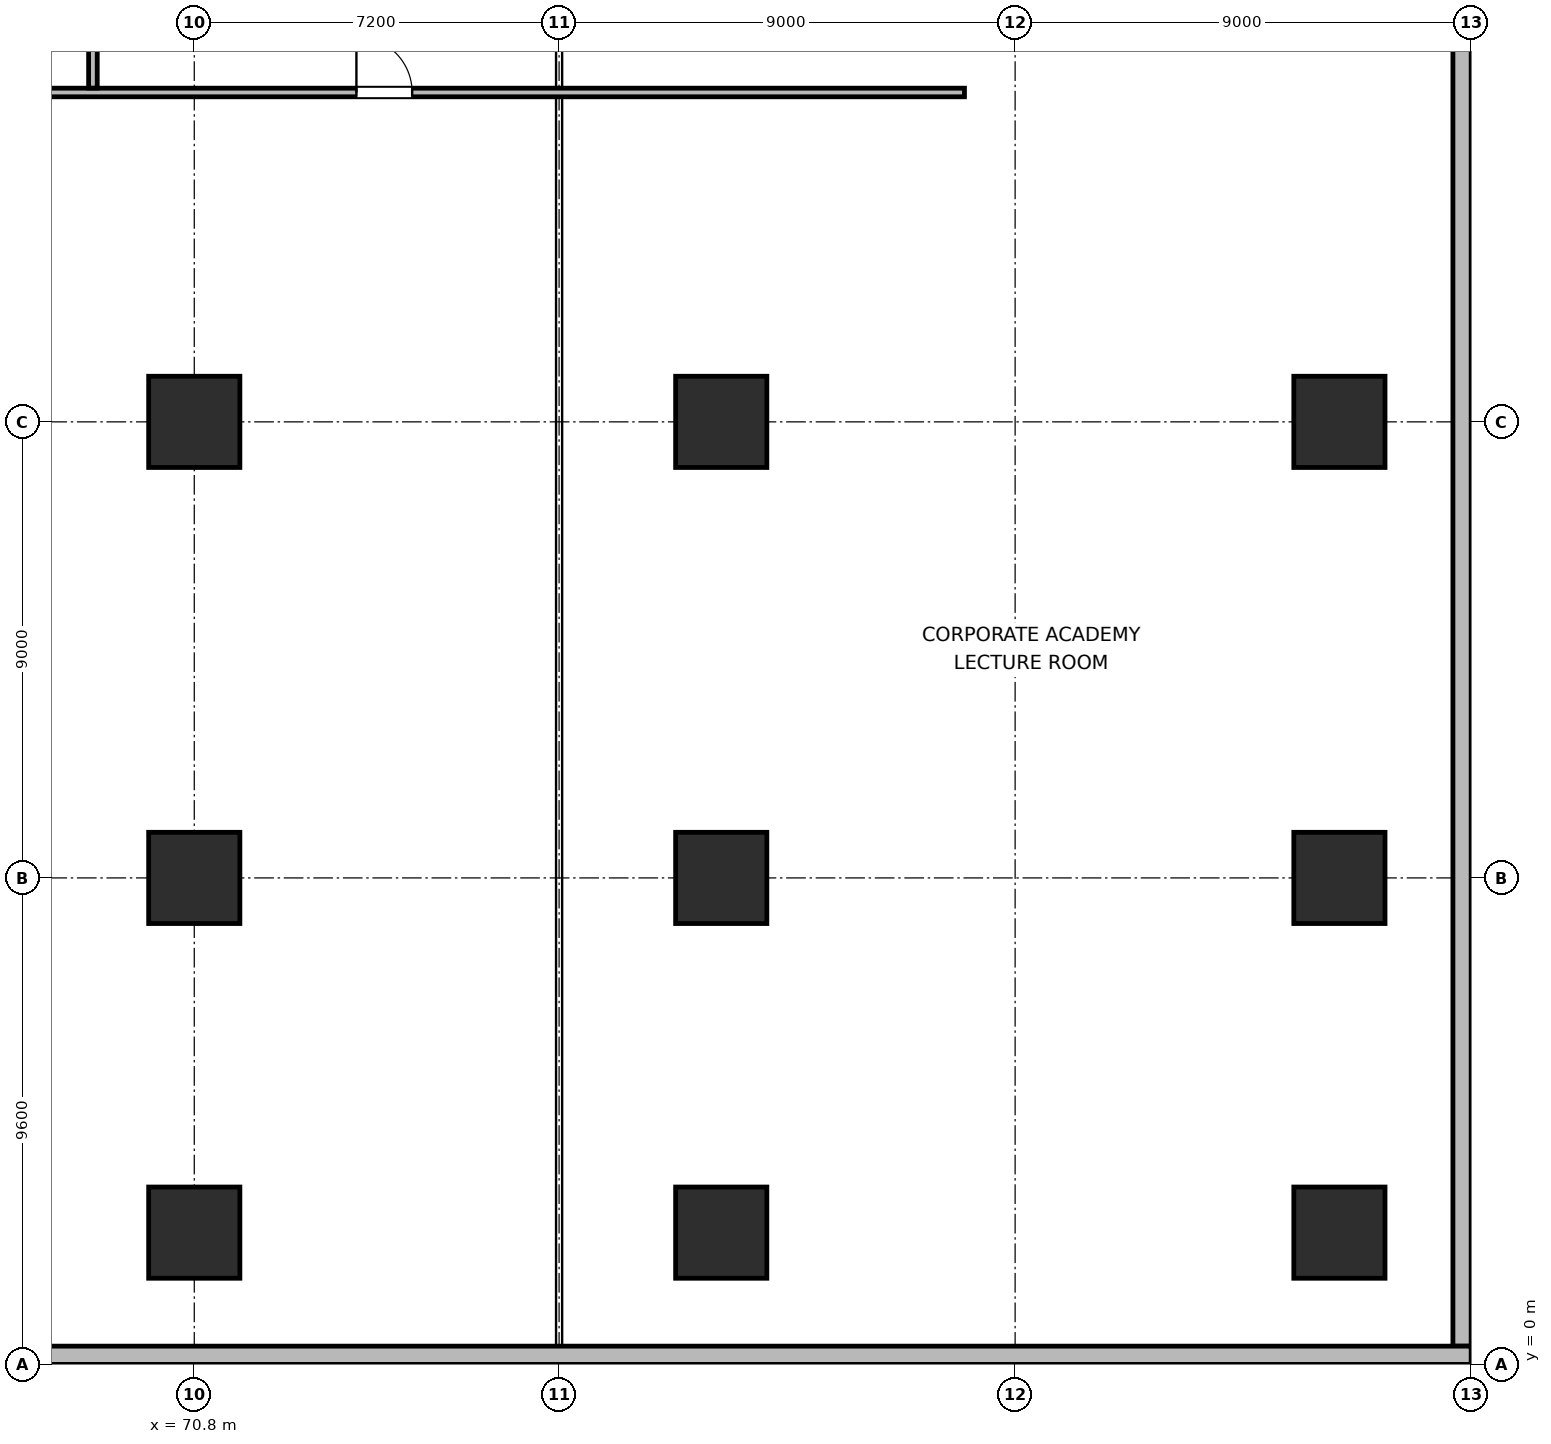
"""IFC4 building model, lengths in metres.
Left out: names, types, materials, properties, quantities, classifications, styles, units other than length and angle.
Written with IfcOpenShell. Run it as: python <this file> out.ifc"""

import sys

from ifc_helpers import new_model, si_unit, direction, frame, frame_2d, origin, origin_2d, place, context, subcontext, project, spatial, rectangle, extrude, element, fill, save


model = new_model("IFC4")
c1 = context("Model", 3, precision=1e-05, world=origin(), true_north=direction((0.0, 1.0)))
c2 = subcontext(c1, "Body", "Model", "MODEL_VIEW")
j1 = project(units=[si_unit("LENGTHUNIT", "METRE"), si_unit("PLANEANGLEUNIT", "RADIAN")], contexts=[c1])
p1 = place(None, origin())
s1 = spatial("IfcSite", under=j1, at=p1, CompositionType="ELEMENT")
p2 = place(p1, origin())
s2 = spatial("IfcBuilding", under=s1, at=p2, CompositionType="ELEMENT")
p3 = place(p2, frame((0.0, 0.0, 12.9)))
s3 = spatial("IfcBuildingStorey", under=s2, at=p3, CompositionType="ELEMENT", Elevation=12.9)
for number, where, z_axis, x_axis in (
    (1, (70.8, 2.6, 0.0), (0.0, 0.0, 1.0), (1.0, 0.0, 0.0)),
    (2, (70.8, 9.6, 0.0), (0.0, 0.0, 1.0), (1.0, 0.0, 0.0)),
    (3, (70.8, 18.6, 0.0), (0.0, 0.0, 1.0), (1.0, 0.0, 0.0)),
    (4, (81.2, 2.6, 0.0), (0.0, 0.0, 1.0), (1.0, 0.0, 0.0)),
    (5, (81.2, 9.6, 0.0), (0.0, 0.0, 1.0), (1.0, 0.0, 0.0)),
    (6, (81.2, 18.6, 0.0), (0.0, 0.0, 1.0), (1.0, 0.0, 0.0)),
    (7, (93.4, 2.6, 0.0), (0.0, 0.0, 1.0), (1.0, 0.0, 0.0)),
    (8, (93.4, 9.6, 0.0), (0.0, 0.0, 1.0), (1.0, 0.0, 0.0)),
    (9, (93.4, 18.6, 0.0), (0.0, 0.0, 1.0), (1.0, 0.0, 0.0)),
):
    element("IfcColumn", number, at=place(p3, frame(where, z_axis=z_axis, x_axis=x_axis)), inside=s3, PredefinedType="COLUMN", context=c2, shape_type="SweptSolid", body=[
        extrude(rectangle(XDim=1.8, YDim=1.8, at=origin_2d()), origin(), (0.0, 0.0, 1.0), 4.2),
    ])
p4 = place(p3, frame((95.82, 71.64, 0.0), z_axis=(0.0, 0.0, 1.0), x_axis=(0.0, -1.0, 0.0)))
e10 = element("IfcWall", 10, at=p4, inside=s3, PredefinedType="SOLIDWALL", context=c2, shape_type="SweptSolid", body=[
    extrude(rectangle(XDim=71.28, YDim=0.36, at=frame_2d((35.64, 0.0))), origin(), (0.0, 0.0, 1.0), 3.84),
])
p5 = place(p3, frame((96.0, 0.18, 0.0), z_axis=(0.0, 0.0, 1.0), x_axis=(-1.0, 0.0, 0.0)))
e11 = element("IfcWall", 11, at=p5, inside=s3, PredefinedType="SOLIDWALL", context=c2, shape_type="SweptSolid", body=[
    extrude(rectangle(XDim=39.72, YDim=0.36, at=frame_2d((19.86, 0.0))), origin(), (0.0, 0.0, 1.0), 3.84),
])
p6 = place(p3, frame((10.0, 25.1, 0.0), z_axis=(0.0, 0.0, 1.0), x_axis=(1.0, 0.0, 0.0)))
e12 = element("IfcWall", 12, at=p6, inside=s3, PredefinedType="PARTITIONING", context=c2, shape_type="SweptSolid", body=[
    extrude(rectangle(XDim=76.0, YDim=0.17, at=frame_2d((38.0, 0.0))), origin(), (0.0, 0.0, 1.0), 3.84),
])
p7 = place(p6, frame((2.2, 0.0, 0.0)))
e13 = element("IfcOpeningElement", 13, at=p7, cuts=e12, PredefinedType="OPENING", context=c2, shape_type="SweptSolid", body=[
    extrude(rectangle(XDim=1.8, YDim=2.06, at=frame_2d((0.9, 1.03))), frame((0.0, 0.095, 0.0), z_axis=(0.0, -1.0, 0.0), x_axis=(1.0, 0.0, 0.0)), (0.0, 0.0, 1.0), 0.19),
])
p8 = place(p6, frame((34.0, 0.0, 0.0)))
e14 = element("IfcOpeningElement", 14, at=p8, cuts=e12, PredefinedType="OPENING", context=c2, shape_type="SweptSolid", body=[
    extrude(rectangle(XDim=1.8, YDim=2.06, at=frame_2d((0.9, 1.03))), frame((0.0, 0.095, 0.0), z_axis=(0.0, -1.0, 0.0), x_axis=(1.0, 0.0, 0.0)), (0.0, 0.0, 1.0), 0.19),
])
p9 = place(p6, frame((64.0, 0.0, 0.0)))
e15 = element("IfcOpeningElement", 15, at=p9, cuts=e12, PredefinedType="OPENING", context=c2, shape_type="SweptSolid", body=[
    extrude(rectangle(XDim=1.1, YDim=2.05, at=frame_2d((0.55, 1.025))), frame((0.0, 0.095, 0.0), z_axis=(0.0, -1.0, 0.0), x_axis=(1.0, 0.0, 0.0)), (0.0, 0.0, 1.0), 0.19),
])
p10 = place(p3, frame((68.8, 25.187, 0.0), z_axis=(0.0, 0.0, 1.0), x_axis=(0.0, 1.0, 0.0)))
e16 = element("IfcWall", 16, at=p10, inside=s3, PredefinedType="PARTITIONING", context=c2, shape_type="SweptSolid", body=[
    extrude(rectangle(XDim=46.448, YDim=0.17, at=frame_2d((23.224, 0.0))), origin(), (0.0, 0.0, 1.0), 3.84),
])
p11 = place(p10, frame((15.913, 0.0, 0.0)))
e17 = element("IfcOpeningElement", 17, at=p11, cuts=e16, PredefinedType="OPENING", context=c2, shape_type="SweptSolid", body=[
    extrude(rectangle(XDim=1.1, YDim=2.05, at=frame_2d((0.55, 1.025))), frame((0.0, 0.095, 0.0), z_axis=(0.0, -1.0, 0.0), x_axis=(1.0, 0.0, 0.0)), (0.0, 0.0, 1.0), 0.19),
])
p12 = place(p9, origin())
e18 = element("IfcDoor", 18, at=p12, inside=s3, OperationType="SINGLE_SWING_LEFT", PredefinedType="DOOR", context=c2, shape_type="SweptSolid", body=[
    extrude(rectangle(XDim=1.1, YDim=2.05, at=frame_2d((0.55, 1.025))), frame((0.0, 0.025, 0.0), z_axis=(0.0, -1.0, 0.0), x_axis=(1.0, 0.0, 0.0)), (0.0, 0.0, 1.0), 0.05),
])
fill(e15, e18)
save(model, sys.argv[1])
